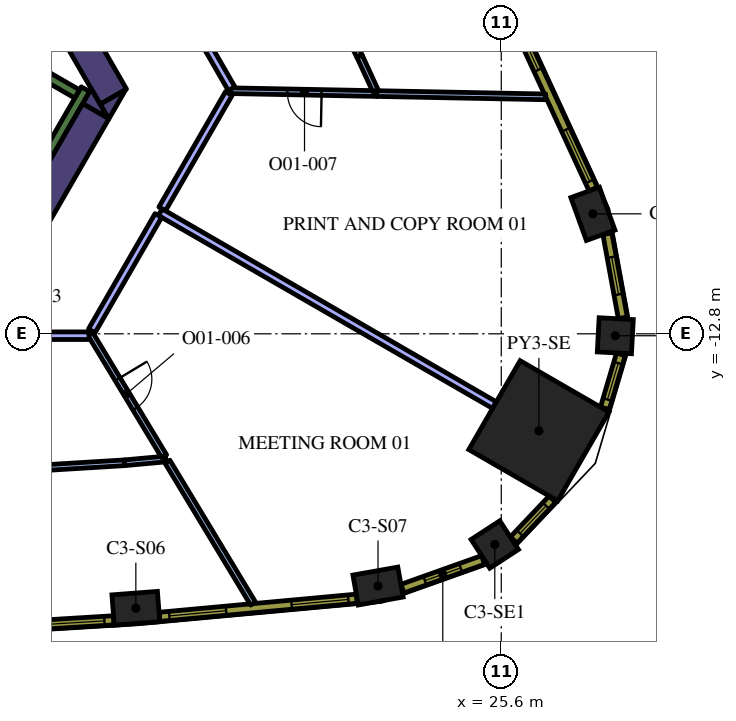
"""IFC4 building model, lengths in metres.
Left out: names, types, materials, properties, quantities, classifications, styles, units other than length and angle.
Written with IfcOpenShell. Run it as: python <this file> out.ifc"""

import sys

from ifc_helpers import new_model, si_unit, direction, frame, frame_2d, origin, origin_2d, place, context, subcontext, project, spatial, polyline, rectangle, outline, extrude, element, fill, save


model = new_model("IFC4")
c1 = context("Model", 3, precision=1e-05, world=origin(), true_north=direction((0.0, 1.0)))
c2 = subcontext(c1, "Body", "Model", "MODEL_VIEW")
j1 = project(units=[si_unit("LENGTHUNIT", "METRE"), si_unit("PLANEANGLEUNIT", "RADIAN")], contexts=[c1])
p1 = place(None, origin())
s1 = spatial("IfcSite", under=j1, at=p1, CompositionType="ELEMENT")
p2 = place(p1, origin())
s2 = spatial("IfcBuilding", under=s1, at=p2, CompositionType="ELEMENT")
p3 = place(p2, frame((0.0, 0.0, 141.6)))
s3 = spatial("IfcBuildingStorey", under=s2, at=p3, CompositionType="ELEMENT", Elevation=141.6)
p4 = place(p3, frame((26.591, -15.352, 0.0), z_axis=(0.0, 0.0, 1.0), x_axis=(0.866025403784, -0.5, 0.0)))
e1 = element("IfcColumn", 1, at=p4, inside=s3, PredefinedType="COLUMN", context=c2, shape_type="SweptSolid", body=[
    extrude(rectangle(XDim=2.7, YDim=2.7, at=origin_2d()), origin(), (0.0, 0.0, 1.0), 4.2),
])
for number, where, z_axis, x_axis in (
    (2, (15.985, -20.022, 0.0), (0.0, 0.0, 1.0), (0.997, 0.076, 0.0)),
    (3, (22.357, -19.437, 0.0), (0.0, 0.0, 1.0), (0.985, 0.175, 0.0)),
):
    element("IfcColumn", number, at=place(p3, frame(where, z_axis=z_axis, x_axis=x_axis)), inside=s3, PredefinedType="COLUMN", context=c2, shape_type="SweptSolid", body=[
        extrude(rectangle(XDim=1.2, YDim=0.8, at=origin_2d()), origin(), (0.0, 0.0, 1.0), 4.2),
    ])
for number, where, z_axis, x_axis in (
    (4, (25.43, -18.344, 0.0), (0.0, 0.0, 1.0), (0.838, 0.546, 0.0)),
    (5, (28.601, -12.851, 0.0), (0.0, 0.0, 1.0), (0.053, 0.999, 0.0)),
):
    element("IfcColumn", number, at=place(p3, frame(where, z_axis=z_axis, x_axis=x_axis)), inside=s3, PredefinedType="COLUMN", context=c2, shape_type="SweptSolid", body=[
        extrude(rectangle(XDim=0.9, YDim=0.9, at=origin_2d()), origin(), (0.0, 0.0, 1.0), 4.2),
    ])
p5 = place(p3, frame((28.012, -9.644, 0.0), z_axis=(0.0, 0.0, 1.0), x_axis=(-0.340743851601, 0.940156171918, 0.0)))
e6 = element("IfcColumn", 6, at=p5, inside=s3, PredefinedType="COLUMN", context=c2, shape_type="SweptSolid", body=[
    extrude(rectangle(XDim=1.2, YDim=0.8, at=origin_2d()), origin(), (0.0, 0.0, 1.0), 4.2),
])
p6 = place(p3, frame((9.129, 4.289, 0.0), z_axis=(0.0, 0.0, 1.0), x_axis=(0.499995742806, -0.866027861663, 0.0)))
e7 = element("IfcWall", 7, at=p6, inside=s3, PredefinedType="SOLIDWALL", context=c2, shape_type="SweptSolid", body=[
    extrude(rectangle(XDim=12.527, YDim=0.8, at=frame_2d((6.264, 0.0))), origin(), (0.0, 0.0, 1.0), 4.2),
])
p7 = place(p3, origin())
e8 = element("IfcWall", 8, at=p7, inside=s3, PredefinedType="SOLIDWALL", context=c2, shape_type="SweptSolid", body=[
    extrude(outline(polyline([(15.271, -7.15), (15.047, -6.762), (15.719, -6.374), (15.271, -7.15)])), origin(), (0.0, 0.0, 1.0), 4.2),
])
p8 = place(p3, frame((13.018, -10.252, 0.0), z_axis=(0.0, 0.0, 1.0), x_axis=(0.499984020225, 0.866034629516, 0.0)))
e9 = element("IfcWall", 9, at=p8, inside=s3, PredefinedType="SOLIDWALL", context=c2, shape_type="SweptSolid", body=[
    extrude(rectangle(XDim=3.824, YDim=0.8, at=frame_2d((1.912, 0.0))), origin(), (0.0, 0.0, 1.0), 4.2),
])
e10 = element("IfcWall", 10, at=p7, inside=s3, PredefinedType="SOLIDWALL", context=c2, shape_type="SweptSolid", body=[
    extrude(outline(polyline([(14.809, -6.35), (15.257, -7.126), (14.585, -6.738), (14.809, -6.35)])), origin(), (0.0, 0.0, 1.0), 4.2),
])
p9 = place(p3, frame((12.84, -9.511, 0.0), z_axis=(0.0, 0.0, 1.0), x_axis=(0.499997733992, 0.866026712061, 0.0)))
e11 = element("IfcWall", 11, at=p9, inside=s3, PredefinedType="SOLIDWALL", context=c2, shape_type="SweptSolid", body=[
    extrude(rectangle(XDim=3.634, YDim=0.25, at=frame_2d((1.817, 0.0))), origin(), (0.0, 0.0, 1.0), 4.2),
])
p10 = place(p3, frame((8.334, -2.964, 0.0), z_axis=(0.0, 0.0, 1.0), x_axis=(0.866016039709, -0.500016218704, 0.0)))
e12 = element("IfcWall", 12, at=p10, inside=s3, PredefinedType="SOLIDWALL", context=c2, shape_type="SweptSolid", body=[
    extrude(rectangle(XDim=7.05, YDim=0.25, at=frame_2d((3.525, 0.0))), origin(), (0.0, 0.0, 1.0), 4.2),
])
p11 = place(p3, frame((15.692, -16.193, 0.0), z_axis=(0.0, 0.0, 1.0), x_axis=(-0.998137075468, -0.061011298754, 0.0)))
e13 = element("IfcWall", 13, at=p11, inside=s3, PredefinedType="PARTITIONING", context=c2, shape_type="SweptSolid", body=[
    extrude(rectangle(XDim=6.282, YDim=0.15, at=frame_2d((3.141, 0.0))), origin(), (0.0, 0.0, 1.0), 3.15),
])
p12 = place(p11, frame((2.683, 0.0, 0.0)))
e14 = element("IfcOpeningElement", 14, at=p12, cuts=e13, PredefinedType="OPENING", context=c2, shape_type="SweptSolid", body=[
    extrude(rectangle(XDim=0.9, YDim=2.1, at=frame_2d((0.45, 1.05))), frame((0.0, 0.085, 0.0), z_axis=(0.0, -1.0, 0.0), x_axis=(1.0, 0.0, 0.0)), (0.0, 0.0, 1.0), 0.17),
])
p13 = place(p3, frame((15.692, -16.193, 0.0), z_axis=(0.0, 0.0, 1.0), x_axis=(0.995822859979, 0.091306251389, 0.0)))
e15 = element("IfcWall", 15, at=p13, inside=s3, PredefinedType="PARTITIONING", context=c2, shape_type="SweptSolid", body=[
    extrude(rectangle(XDim=1.086, YDim=0.15, at=frame_2d((0.543, 0.0))), origin(), (0.0, 0.0, 1.0), 3.15),
])
p14 = place(p3, frame((16.816, -16.165, 0.0), z_axis=(0.0, 0.0, 1.0), x_axis=(0.516814925326, -0.85609715159, 0.0)))
e16 = element("IfcWall", 16, at=p14, inside=s3, PredefinedType="PARTITIONING", context=c2, shape_type="SweptSolid", body=[
    extrude(rectangle(XDim=4.362, YDim=0.15, at=frame_2d((2.181, 0.0))), origin(), (0.0, 0.0, 1.0), 3.15),
])
p15 = place(p3, frame((14.782, -12.796, 0.0), z_axis=(0.0, 0.0, 1.0), x_axis=(0.516809076879, -0.856100682196, 0.0)))
e17 = element("IfcWall", 17, at=p15, inside=s3, PredefinedType="PARTITIONING", context=c2, shape_type="SweptSolid", body=[
    extrude(rectangle(XDim=3.768, YDim=0.15, at=frame_2d((1.884, 0.0))), origin(), (0.0, 0.0, 1.0), 3.15),
])
p16 = place(p15, frame((1.4, 0.0, 0.0)))
e18 = element("IfcOpeningElement", 18, at=p16, cuts=e17, PredefinedType="OPENING", context=c2, shape_type="SweptSolid", body=[
    extrude(rectangle(XDim=0.9, YDim=2.1, at=frame_2d((0.45, 1.05))), frame((0.0, 0.085, 0.0), z_axis=(0.0, -1.0, 0.0), x_axis=(1.0, 0.0, 0.0)), (0.0, 0.0, 1.0), 0.17),
])
p17 = place(p3, frame((5.03, -12.85, 0.0), z_axis=(0.0, 0.0, 1.0), x_axis=(1.0, 0.0, 0.0)))
e19 = element("IfcWall", 19, at=p17, inside=s3, PredefinedType="PARTITIONING", context=c2, shape_type="SweptSolid", body=[
    extrude(rectangle(XDim=9.721, YDim=0.2, at=frame_2d((4.861, 0.0))), origin(), (0.0, 0.0, 1.0), 3.15),
])
p18 = place(p3, frame((16.628, -9.6, 0.0), z_axis=(0.0, 0.0, 1.0), x_axis=(0.866031435434, -0.499989552732, 0.0)))
e20 = element("IfcWall", 20, at=p18, inside=s3, PredefinedType="PARTITIONING", context=c2, shape_type="SweptSolid", body=[
    extrude(rectangle(XDim=10.154, YDim=0.2, at=frame_2d((5.077, 0.0))), origin(), (0.0, 0.0, 1.0), 3.15),
])
p19 = place(p3, frame((14.825, -12.722, 0.0), z_axis=(0.0, 0.0, 1.0), x_axis=(0.499981686864, 0.86603597662, 0.0)))
e21 = element("IfcWall", 21, at=p19, inside=s3, PredefinedType="PARTITIONING", context=c2, shape_type="SweptSolid", body=[
    extrude(rectangle(XDim=3.506, YDim=0.2, at=frame_2d((1.753, 0.0))), origin(), (0.0, 0.0, 1.0), 3.15),
])
p20 = place(p3, frame((22.32, -6.479, 0.0), z_axis=(0.0, 0.0, 1.0), x_axis=(0.999809252738, -0.019530953357, 0.0)))
e22 = element("IfcWall", 22, at=p20, inside=s3, PredefinedType="PARTITIONING", context=c2, shape_type="SweptSolid", body=[
    extrude(rectangle(XDim=4.45, YDim=0.15, at=frame_2d((2.225, 0.0))), origin(), (0.0, 0.0, 1.0), 3.15),
])
p21 = place(p3, frame((22.328, -6.479, 0.0), z_axis=(0.0, 0.0, 1.0), x_axis=(-0.999809811932, 0.019502306655, 0.0)))
e23 = element("IfcWall", 23, at=p21, inside=s3, PredefinedType="PARTITIONING", context=c2, shape_type="SweptSolid", body=[
    extrude(rectangle(XDim=3.856, YDim=0.15, at=frame_2d((1.928, 0.0))), origin(), (0.0, 0.0, 1.0), 3.15),
])
p22 = place(p21, frame((1.456, 0.0, 0.0)))
e24 = element("IfcOpeningElement", 24, at=p22, cuts=e23, PredefinedType="OPENING", context=c2, shape_type="SweptSolid", body=[
    extrude(rectangle(XDim=0.9, YDim=2.1, at=frame_2d((0.45, 1.05))), frame((0.0, 0.085, 0.0), z_axis=(0.0, -1.0, 0.0), x_axis=(1.0, 0.0, 0.0)), (0.0, 0.0, 1.0), 0.17),
])
p23 = place(p3, frame((16.678, -9.513, 0.0), z_axis=(0.0, 0.0, 1.0), x_axis=(0.500011844827, 0.866018565062, 0.0)))
e25 = element("IfcWall", 25, at=p23, inside=s3, PredefinedType="PARTITIONING", context=c2, shape_type="SweptSolid", body=[
    extrude(rectangle(XDim=3.505, YDim=0.2, at=frame_2d((1.753, 0.0))), origin(), (0.0, 0.0, 1.0), 3.15),
])
p24 = place(p3, frame((22.289, -6.403, 0.0), z_axis=(0.0, 0.0, 1.0), x_axis=(-0.41893460807, 0.908016406328, 0.0)))
e26 = element("IfcWall", 26, at=p24, inside=s3, PredefinedType="PARTITIONING", context=c2, shape_type="SweptSolid", body=[
    extrude(rectangle(XDim=1.002, YDim=0.15, at=frame_2d((0.501, 0.0))), origin(), (0.0, 0.0, 1.0), 3.15),
])
p25 = place(p3, frame((19.066, 0.129, 0.0), z_axis=(0.0, 0.0, 1.0), x_axis=(0.446202922071, -0.89493181435, 0.0)))
e27 = element("IfcWall", 27, at=p25, inside=s3, PredefinedType="PARTITIONING", context=c2, shape_type="SweptSolid", body=[
    extrude(rectangle(XDim=6.282, YDim=0.15, at=frame_2d((3.141, 0.0))), origin(), (0.0, 0.0, 1.0), 3.15),
])
p26 = place(p25, frame((2.683, 0.0, 0.0)))
e28 = element("IfcOpeningElement", 28, at=p26, cuts=e27, PredefinedType="OPENING", context=c2, shape_type="SweptSolid", body=[
    extrude(rectangle(XDim=0.9, YDim=2.1, at=frame_2d((0.45, 1.05))), frame((0.0, 0.085, 0.0), z_axis=(0.0, -1.0, 0.0), x_axis=(1.0, 0.0, 0.0)), (0.0, 0.0, 1.0), 0.17),
])
p27 = place(p3, frame((18.504, -6.35, 0.0), z_axis=(0.0, 0.0, 1.0), x_axis=(-0.499995029582, 0.866028273438, 0.0)))
e29 = element("IfcWall", 29, at=p27, inside=s3, PredefinedType="PARTITIONING", context=c2, shape_type="SweptSolid", body=[
    extrude(rectangle(XDim=9.717, YDim=0.2, at=frame_2d((4.859, 0.0))), origin(), (0.0, 0.0, 1.0), 3.15),
])
p28 = place(p3, frame((10.211, -20.656, 0.0), z_axis=(0.0, 0.0, 1.0), x_axis=(0.998135294646, 0.061040425794, 0.0)))
e30 = element("IfcWall", 30, at=p28, inside=s3, PredefinedType="SOLIDWALL", context=c2, shape_type="SweptSolid", body=[
    extrude(rectangle(XDim=5.204, YDim=0.24, at=frame_2d((2.602, 0.0))), origin(), (0.0, 0.0, 1.0), 3.95),
])
p29 = place(p28, frame((0.248, 0.0, 0.9)))
e31 = element("IfcOpeningElement", 31, at=p29, cuts=e30, PredefinedType="OPENING", context=c2, shape_type="SweptSolid", body=[
    extrude(rectangle(XDim=1.5, YDim=2.55, at=frame_2d((0.75, 1.275))), frame((0.0, 0.13, 0.0), z_axis=(0.0, -1.0, 0.0), x_axis=(1.0, 0.0, 0.0)), (0.0, 0.0, 1.0), 0.26),
])
p30 = place(p28, frame((3.455, 0.0, 0.9)))
e32 = element("IfcOpeningElement", 32, at=p30, cuts=e30, PredefinedType="OPENING", context=c2, shape_type="SweptSolid", body=[
    extrude(rectangle(XDim=1.5, YDim=2.55, at=frame_2d((0.75, 1.275))), frame((0.0, 0.13, 0.0), z_axis=(0.0, -1.0, 0.0), x_axis=(1.0, 0.0, 0.0)), (0.0, 0.0, 1.0), 0.26),
])
p31 = place(p3, frame((16.606, -20.247, 0.0), z_axis=(0.0, 0.0, 1.0), x_axis=(0.995808712151, 0.091460422067, 0.0)))
e33 = element("IfcWall", 33, at=p31, inside=s3, PredefinedType="SOLIDWALL", context=c2, shape_type="SweptSolid", body=[
    extrude(rectangle(XDim=5.213, YDim=0.24, at=frame_2d((2.606, 0.0))), origin(), (0.0, 0.0, 1.0), 3.95),
])
p32 = place(p31, frame((0.261, 0.0, 0.9)))
e34 = element("IfcOpeningElement", 34, at=p32, cuts=e33, PredefinedType="OPENING", context=c2, shape_type="SweptSolid", body=[
    extrude(rectangle(XDim=1.5, YDim=2.55, at=frame_2d((0.75, 1.275))), frame((0.0, 0.13, 0.0), z_axis=(0.0, -1.0, 0.0), x_axis=(1.0, 0.0, 0.0)), (0.0, 0.0, 1.0), 0.26),
])
p33 = place(p31, frame((3.492, 0.0, 0.9)))
e35 = element("IfcOpeningElement", 35, at=p33, cuts=e33, PredefinedType="OPENING", context=c2, shape_type="SweptSolid", body=[
    extrude(rectangle(XDim=1.5, YDim=2.55, at=frame_2d((0.75, 1.275))), frame((0.0, 0.13, 0.0), z_axis=(0.0, -1.0, 0.0), x_axis=(1.0, 0.0, 0.0)), (0.0, 0.0, 1.0), 0.26),
])
p34 = place(p3, frame((23.001, -19.505, 0.0), z_axis=(0.0, 0.0, 1.0), x_axis=(0.942099727267, 0.335332825539, 0.0)))
e36 = element("IfcWall", 36, at=p34, inside=s3, PredefinedType="SOLIDWALL", context=c2, shape_type="SweptSolid", body=[
    extrude(rectangle(XDim=2.25, YDim=0.24, at=frame_2d((1.125, 0.0))), origin(), (0.0, 0.0, 1.0), 3.95),
])
p35 = place(p34, frame((0.625, 0.0, 0.9)))
e37 = element("IfcOpeningElement", 37, at=p35, cuts=e36, PredefinedType="OPENING", context=c2, shape_type="SweptSolid", body=[
    extrude(rectangle(XDim=1.0, YDim=2.55, at=frame_2d((0.5, 1.275))), frame((0.0, 0.13, 0.0), z_axis=(0.0, -1.0, 0.0), x_axis=(1.0, 0.0, 0.0)), (0.0, 0.0, 1.0), 0.26),
])
p36 = place(p3, frame((25.927, -18.226, 0.0), z_axis=(0.0, 0.0, 1.0), x_axis=(0.687986858937, 0.725723144133, 0.0)))
e38 = element("IfcWall", 38, at=p36, inside=s3, PredefinedType="SOLIDWALL", context=c2, shape_type="SweptSolid", body=[
    extrude(rectangle(XDim=1.481, YDim=0.24, at=frame_2d((0.741, 0.0))), origin(), (0.0, 0.0, 1.0), 3.95),
])
p37 = place(p36, frame((0.241, 0.0, 0.9)))
e39 = element("IfcOpeningElement", 39, at=p37, cuts=e38, PredefinedType="OPENING", context=c2, shape_type="SweptSolid", body=[
    extrude(rectangle(XDim=1.0, YDim=2.55, at=frame_2d((0.5, 1.275))), frame((0.0, 0.13, 0.0), z_axis=(0.0, -1.0, 0.0), x_axis=(1.0, 0.0, 0.0)), (0.0, 0.0, 1.0), 0.26),
])
p38 = place(p3, frame((28.326, -14.76, 0.0), z_axis=(0.0, 0.0, 1.0), x_axis=(0.284413721403, 0.958701640281, 0.0)))
e40 = element("IfcWall", 40, at=p38, inside=s3, PredefinedType="SOLIDWALL", context=c2, shape_type="SweptSolid", body=[
    extrude(rectangle(XDim=1.482, YDim=0.24, at=frame_2d((0.741, 0.0))), origin(), (0.0, 0.0, 1.0), 3.95),
])
p39 = place(p38, frame((0.241, 0.0, 0.9)))
e41 = element("IfcOpeningElement", 41, at=p39, cuts=e40, PredefinedType="OPENING", context=c2, shape_type="SweptSolid", body=[
    extrude(rectangle(XDim=1.0, YDim=2.55, at=frame_2d((0.5, 1.275))), frame((0.0, 0.13, 0.0), z_axis=(0.0, -1.0, 0.0), x_axis=(1.0, 0.0, 0.0)), (0.0, 0.0, 1.0), 0.26),
])
p40 = place(p3, frame((28.799, -12.38, 0.0), z_axis=(0.0, 0.0, 1.0), x_axis=(-0.180737189259, 0.983531427265, 0.0)))
e42 = element("IfcWall", 42, at=p40, inside=s3, PredefinedType="SOLIDWALL", context=c2, shape_type="SweptSolid", body=[
    extrude(rectangle(XDim=2.25, YDim=0.24, at=frame_2d((1.125, 0.0))), origin(), (0.0, 0.0, 1.0), 3.95),
])
p41 = place(p40, frame((0.625, 0.0, 0.9)))
e43 = element("IfcOpeningElement", 43, at=p41, cuts=e42, PredefinedType="OPENING", context=c2, shape_type="SweptSolid", body=[
    extrude(rectangle(XDim=1.0, YDim=2.55, at=frame_2d((0.5, 1.275))), frame((0.0, 0.13, 0.0), z_axis=(0.0, -1.0, 0.0), x_axis=(1.0, 0.0, 0.0)), (0.0, 0.0, 1.0), 0.26),
])
p42 = place(p3, frame((28.02, -8.992, 0.0), z_axis=(0.0, 0.0, 1.0), x_axis=(-0.418722559465, 0.908114209885, 0.0)))
e44 = element("IfcWall", 44, at=p42, inside=s3, PredefinedType="SOLIDWALL", context=c2, shape_type="SweptSolid", body=[
    extrude(rectangle(XDim=5.213, YDim=0.24, at=frame_2d((2.606, 0.0))), origin(), (0.0, 0.0, 1.0), 3.95),
])
p43 = place(p42, frame((0.221, 0.0, 0.9)))
e45 = element("IfcOpeningElement", 45, at=p43, cuts=e44, PredefinedType="OPENING", context=c2, shape_type="SweptSolid", body=[
    extrude(rectangle(XDim=1.5, YDim=2.55, at=frame_2d((0.75, 1.275))), frame((0.0, 0.13, 0.0), z_axis=(0.0, -1.0, 0.0), x_axis=(1.0, 0.0, 0.0)), (0.0, 0.0, 1.0), 0.26),
])
p44 = place(p42, frame((3.452, 0.0, 0.9)))
e46 = element("IfcOpeningElement", 46, at=p44, cuts=e44, PredefinedType="OPENING", context=c2, shape_type="SweptSolid", body=[
    extrude(rectangle(XDim=1.5, YDim=2.55, at=frame_2d((0.75, 1.275))), frame((0.0, 0.13, 0.0), z_axis=(0.0, -1.0, 0.0), x_axis=(1.0, 0.0, 0.0)), (0.0, 0.0, 1.0), 0.26),
])
p45 = place(p16, origin())
e47 = element("IfcDoor", 47, at=p45, inside=s3, OperationType="SINGLE_SWING_LEFT", PredefinedType="DOOR", context=c2, shape_type="SweptSolid", body=[
    extrude(rectangle(XDim=0.9, YDim=2.1, at=frame_2d((0.45, 1.05))), frame((0.0, 0.025, 0.0), z_axis=(0.0, -1.0, 0.0), x_axis=(1.0, 0.0, 0.0)), (0.0, 0.0, 1.0), 0.05),
])
fill(e18, e47)
p46 = place(p22, origin())
e48 = element("IfcDoor", 48, at=p46, inside=s3, OperationType="SINGLE_SWING_LEFT", PredefinedType="DOOR", context=c2, shape_type="SweptSolid", body=[
    extrude(rectangle(XDim=0.9, YDim=2.1, at=frame_2d((0.45, 1.05))), frame((0.0, 0.025, 0.0), z_axis=(0.0, -1.0, 0.0), x_axis=(1.0, 0.0, 0.0)), (0.0, 0.0, 1.0), 0.05),
])
fill(e24, e48)
p47 = place(p30, origin())
e49 = element("IfcWindow", 49, at=p47, inside=s3, PartitioningType="SINGLE_PANEL", PredefinedType="WINDOW", context=c2, shape_type="SweptSolid", body=[
    extrude(rectangle(XDim=1.5, YDim=2.55, at=frame_2d((0.75, 1.275))), frame((0.0, 0.04, 0.0), z_axis=(0.0, -1.0, 0.0), x_axis=(1.0, 0.0, 0.0)), (0.0, 0.0, 1.0), 0.06),
])
fill(e32, e49)
p48 = place(p32, origin())
e50 = element("IfcWindow", 50, at=p48, inside=s3, PartitioningType="SINGLE_PANEL", PredefinedType="WINDOW", context=c2, shape_type="SweptSolid", body=[
    extrude(rectangle(XDim=1.5, YDim=2.55, at=frame_2d((0.75, 1.275))), frame((0.0, 0.04, 0.0), z_axis=(0.0, -1.0, 0.0), x_axis=(1.0, 0.0, 0.0)), (0.0, 0.0, 1.0), 0.06),
])
fill(e34, e50)
p49 = place(p33, origin())
e51 = element("IfcWindow", 51, at=p49, inside=s3, PartitioningType="SINGLE_PANEL", PredefinedType="WINDOW", context=c2, shape_type="SweptSolid", body=[
    extrude(rectangle(XDim=1.5, YDim=2.55, at=frame_2d((0.75, 1.275))), frame((0.0, 0.04, 0.0), z_axis=(0.0, -1.0, 0.0), x_axis=(1.0, 0.0, 0.0)), (0.0, 0.0, 1.0), 0.06),
])
fill(e35, e51)
p50 = place(p35, origin())
e52 = element("IfcWindow", 52, at=p50, inside=s3, PartitioningType="SINGLE_PANEL", PredefinedType="WINDOW", context=c2, shape_type="SweptSolid", body=[
    extrude(rectangle(XDim=1.0, YDim=2.55, at=frame_2d((0.5, 1.275))), frame((0.0, 0.04, 0.0), z_axis=(0.0, -1.0, 0.0), x_axis=(1.0, 0.0, 0.0)), (0.0, 0.0, 1.0), 0.06),
])
fill(e37, e52)
p51 = place(p37, origin())
e53 = element("IfcWindow", 53, at=p51, inside=s3, PartitioningType="SINGLE_PANEL", PredefinedType="WINDOW", context=c2, shape_type="SweptSolid", body=[
    extrude(rectangle(XDim=1.0, YDim=2.55, at=frame_2d((0.5, 1.275))), frame((0.0, 0.04, 0.0), z_axis=(0.0, -1.0, 0.0), x_axis=(1.0, 0.0, 0.0)), (0.0, 0.0, 1.0), 0.06),
])
fill(e39, e53)
p52 = place(p39, origin())
e54 = element("IfcWindow", 54, at=p52, inside=s3, PartitioningType="SINGLE_PANEL", PredefinedType="WINDOW", context=c2, shape_type="SweptSolid", body=[
    extrude(rectangle(XDim=1.0, YDim=2.55, at=frame_2d((0.5, 1.275))), frame((0.0, 0.04, 0.0), z_axis=(0.0, -1.0, 0.0), x_axis=(1.0, 0.0, 0.0)), (0.0, 0.0, 1.0), 0.06),
])
fill(e41, e54)
p53 = place(p41, origin())
e55 = element("IfcWindow", 55, at=p53, inside=s3, PartitioningType="SINGLE_PANEL", PredefinedType="WINDOW", context=c2, shape_type="SweptSolid", body=[
    extrude(rectangle(XDim=1.0, YDim=2.55, at=frame_2d((0.5, 1.275))), frame((0.0, 0.04, 0.0), z_axis=(0.0, -1.0, 0.0), x_axis=(1.0, 0.0, 0.0)), (0.0, 0.0, 1.0), 0.06),
])
fill(e43, e55)
p54 = place(p43, origin())
e56 = element("IfcWindow", 56, at=p54, inside=s3, PartitioningType="SINGLE_PANEL", PredefinedType="WINDOW", context=c2, shape_type="SweptSolid", body=[
    extrude(rectangle(XDim=1.5, YDim=2.55, at=frame_2d((0.75, 1.275))), frame((0.0, 0.04, 0.0), z_axis=(0.0, -1.0, 0.0), x_axis=(1.0, 0.0, 0.0)), (0.0, 0.0, 1.0), 0.06),
])
fill(e45, e56)
p55 = place(p44, origin())
e57 = element("IfcWindow", 57, at=p55, inside=s3, PartitioningType="SINGLE_PANEL", PredefinedType="WINDOW", context=c2, shape_type="SweptSolid", body=[
    extrude(rectangle(XDim=1.5, YDim=2.55, at=frame_2d((0.75, 1.275))), frame((0.0, 0.04, 0.0), z_axis=(0.0, -1.0, 0.0), x_axis=(1.0, 0.0, 0.0)), (0.0, 0.0, 1.0), 0.06),
])
fill(e46, e57)
save(model, sys.argv[1])
